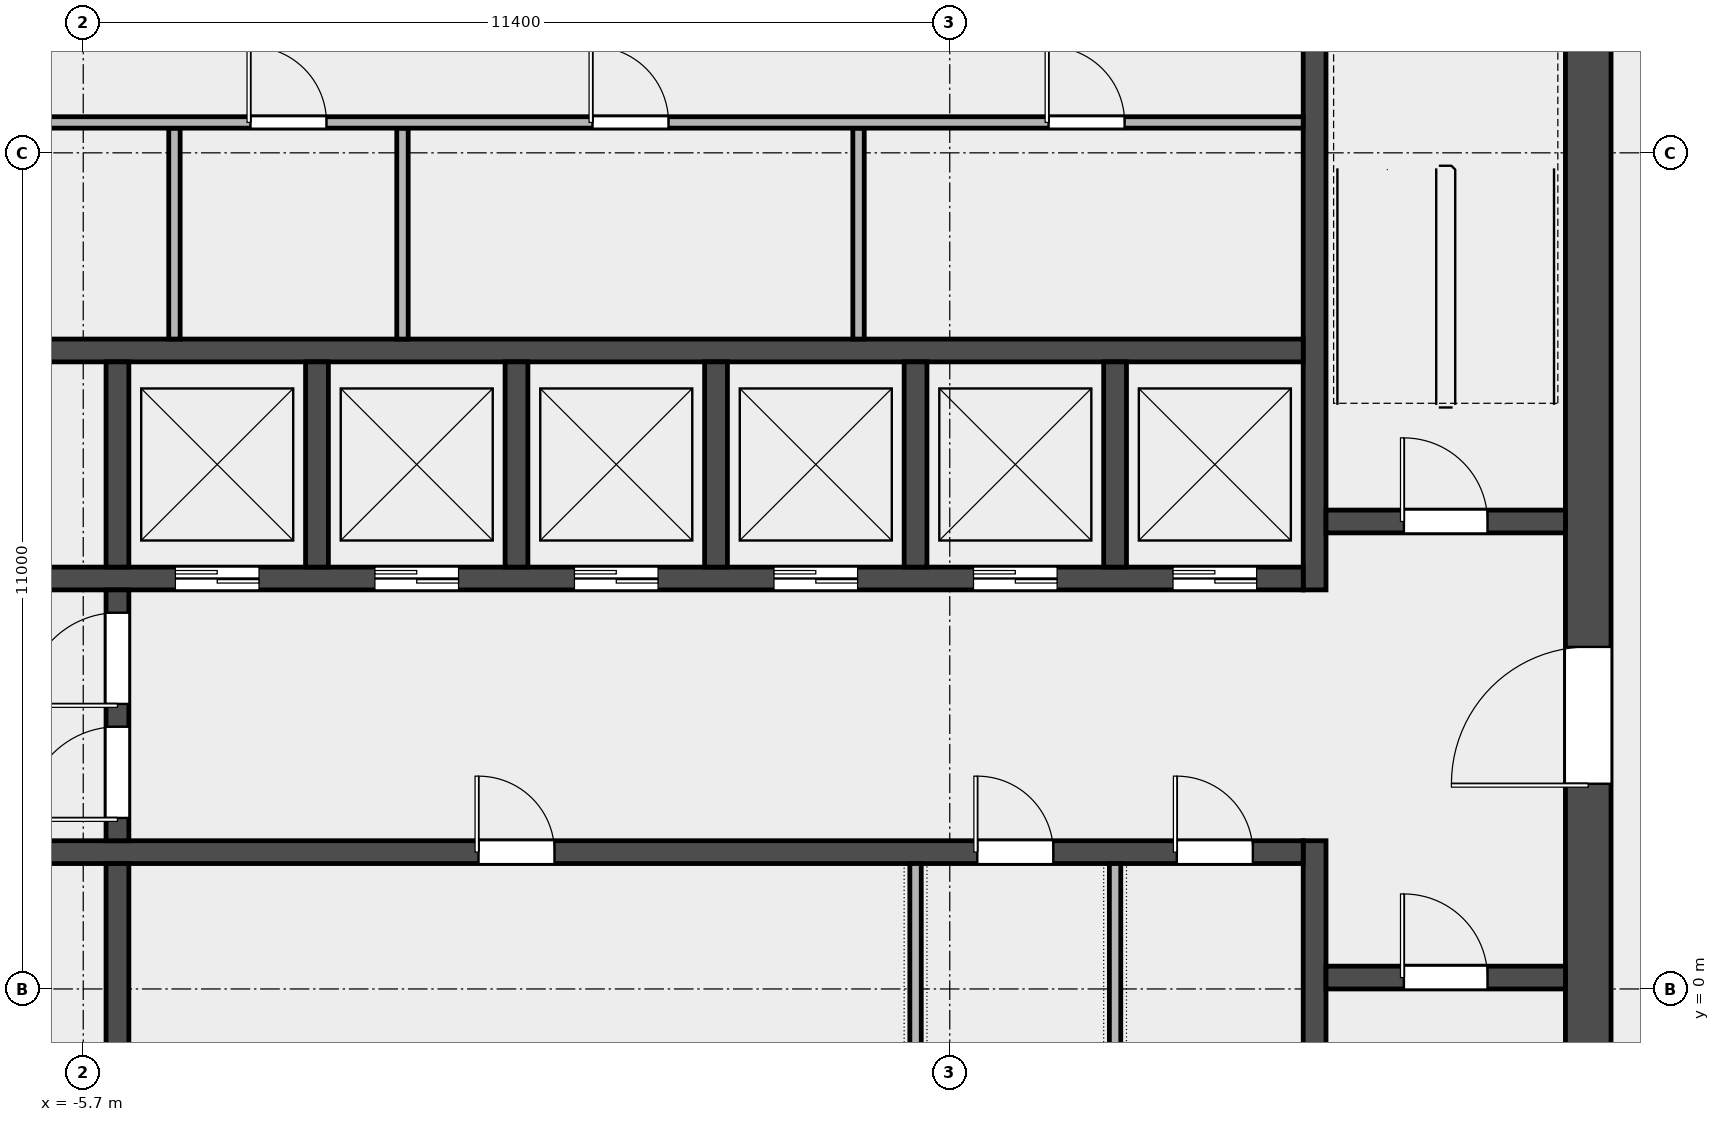
"""IFC4 building model, lengths in metres.
Left out: names, types, materials, properties, quantities, classifications, styles, units other than length and angle.
Written with IfcOpenShell. Run it as: python <this file> out.ifc"""

import sys

from ifc_helpers import new_model, si_unit, direction, frame, frame_2d, origin, place, context, subcontext, project, spatial, rectangle, extrude, element, fill, save


model = new_model("IFC4")
c1 = context("Model", 3, precision=1e-05, world=origin(), true_north=direction((0.0, 1.0)))
c2 = subcontext(c1, "Body", "Model", "MODEL_VIEW")
j1 = project(units=[si_unit("LENGTHUNIT", "METRE"), si_unit("PLANEANGLEUNIT", "RADIAN")], contexts=[c1])
p1 = place(None, origin())
s1 = spatial("IfcSite", under=j1, at=p1, CompositionType="ELEMENT")
p2 = place(p1, origin())
s2 = spatial("IfcBuilding", under=s1, at=p2, CompositionType="ELEMENT")
p3 = place(p2, frame((0.0, 0.0, 231.0)))
s3 = spatial("IfcBuildingStorey", under=s2, at=p3, CompositionType="ELEMENT", Elevation=231.0)
p4 = place(p3, frame((14.1, -6.6, 0.0), z_axis=(0.0, 0.0, 1.0), x_axis=(0.0, 1.0, 0.0)))
e1 = element("IfcWall", 1, at=p4, inside=s3, PredefinedType="SHEAR", context=c2, shape_type="SweptSolid", body=[
    extrude(rectangle(XDim=19.5, YDim=0.6, at=frame_2d((9.75, 0.0))), origin(), (0.0, 0.0, 1.0), 3.7),
])
p5 = place(p4, frame((9.3, 0.0, 0.0)))
e2 = element("IfcOpeningElement", 2, at=p5, cuts=e1, PredefinedType="OPENING", context=c2, shape_type="SweptSolid", body=[
    extrude(rectangle(XDim=1.8, YDim=2.1, at=frame_2d((0.9, 1.05))), frame((0.0, 0.312, 0.0), z_axis=(0.0, -1.0, 0.0), x_axis=(1.0, 0.0, 0.0)), (0.0, 0.0, 1.0), 0.624),
])
p6 = place(p3, frame((10.5, -6.6, 0.0), z_axis=(0.0, 0.0, 1.0), x_axis=(0.0, 1.0, 0.0)))
e3 = element("IfcWall", 3, at=p6, inside=s3, PredefinedType="SHEAR", context=c2, shape_type="SweptSolid", body=[
    extrude(rectangle(XDim=8.55, YDim=0.3, at=frame_2d((4.275, 0.0))), origin(), (0.0, 0.0, 1.0), 3.7),
])
p7 = place(p3, frame((10.5, 5.25, 0.0), z_axis=(0.0, 0.0, 1.0), x_axis=(0.0, 1.0, 0.0)))
e4 = element("IfcWall", 4, at=p7, inside=s3, PredefinedType="SHEAR", context=c2, shape_type="SweptSolid", body=[
    extrude(rectangle(XDim=7.65, YDim=0.3, at=frame_2d((3.825, 0.0))), origin(), (0.0, 0.0, 1.0), 3.7),
])
p8 = place(p3, frame((10.65, 0.15, 0.0), z_axis=(0.0, 0.0, 1.0), x_axis=(1.0, 0.0, 0.0)))
e5 = element("IfcWall", 5, at=p8, inside=s3, PredefinedType="SOLIDWALL", context=c2, shape_type="SweptSolid", body=[
    extrude(rectangle(XDim=3.15, YDim=0.3, at=frame_2d((1.575, 0.0))), origin(), (0.0, 0.0, 1.0), 3.7),
])
p9 = place(p8, frame((1.025, 0.0, 0.0)))
e6 = element("IfcOpeningElement", 6, at=p9, cuts=e5, PredefinedType="OPENING", context=c2, shape_type="SweptSolid", body=[
    extrude(rectangle(XDim=1.1, YDim=2.1, at=frame_2d((0.55, 1.05))), frame((0.0, 0.162, 0.0), z_axis=(0.0, -1.0, 0.0), x_axis=(1.0, 0.0, 0.0)), (0.0, 0.0, 1.0), 0.324),
])
p10 = place(p3, frame((10.65, 6.15, 0.0), z_axis=(0.0, 0.0, 1.0), x_axis=(1.0, 0.0, 0.0)))
e7 = element("IfcWall", 7, at=p10, inside=s3, PredefinedType="SOLIDWALL", context=c2, shape_type="SweptSolid", body=[
    extrude(rectangle(XDim=3.15, YDim=0.3, at=frame_2d((1.575, 0.0))), origin(), (0.0, 0.0, 1.0), 3.7),
])
p11 = place(p10, frame((1.025, 0.0, 0.0)))
e8 = element("IfcOpeningElement", 8, at=p11, cuts=e7, PredefinedType="OPENING", context=c2, shape_type="SweptSolid", body=[
    extrude(rectangle(XDim=1.1, YDim=2.1, at=frame_2d((0.55, 1.05))), frame((0.0, 0.162, 0.0), z_axis=(0.0, -1.0, 0.0), x_axis=(1.0, 0.0, 0.0)), (0.0, 0.0, 1.0), 0.324),
])
p12 = place(p3, frame((-10.35, 1.8, 0.0), z_axis=(0.0, 0.0, 1.0), x_axis=(1.0, 0.0, 0.0)))
e9 = element("IfcWall", 9, at=p12, inside=s3, PredefinedType="SOLIDWALL", context=c2, shape_type="SweptSolid", body=[
    extrude(rectangle(XDim=20.7, YDim=0.3, at=frame_2d((10.35, 0.0))), origin(), (0.0, 0.0, 1.0), 3.7),
])
p13 = place(p12, frame((0.512, 0.0, 0.0)))
e10 = element("IfcOpeningElement", 10, at=p13, cuts=e9, PredefinedType="OPENING", context=c2, shape_type="SweptSolid", body=[
    extrude(rectangle(XDim=1.3, YDim=2.1, at=frame_2d((0.65, 1.05))), frame((0.0, 0.162, 0.0), z_axis=(0.0, -1.0, 0.0), x_axis=(1.0, 0.0, 0.0)), (0.0, 0.0, 1.0), 0.324),
])
p14 = place(p12, frame((9.85, 0.0, 0.0)))
e11 = element("IfcOpeningElement", 11, at=p14, cuts=e9, PredefinedType="OPENING", context=c2, shape_type="SweptSolid", body=[
    extrude(rectangle(XDim=1.0, YDim=2.1, at=frame_2d((0.5, 1.05))), frame((0.0, 0.162, 0.0), z_axis=(0.0, -1.0, 0.0), x_axis=(1.0, 0.0, 0.0)), (0.0, 0.0, 1.0), 0.324),
])
p15 = place(p12, frame((16.413, 0.0, 0.0)))
e12 = element("IfcOpeningElement", 12, at=p15, cuts=e9, PredefinedType="OPENING", context=c2, shape_type="SweptSolid", body=[
    extrude(rectangle(XDim=1.0, YDim=2.1, at=frame_2d((0.5, 1.05))), frame((0.0, 0.162, 0.0), z_axis=(0.0, -1.0, 0.0), x_axis=(1.0, 0.0, 0.0)), (0.0, 0.0, 1.0), 0.324),
])
p16 = place(p12, frame((19.038, 0.0, 0.0)))
e13 = element("IfcOpeningElement", 13, at=p16, cuts=e9, PredefinedType="OPENING", context=c2, shape_type="SweptSolid", body=[
    extrude(rectangle(XDim=1.0, YDim=2.1, at=frame_2d((0.5, 1.05))), frame((0.0, 0.162, 0.0), z_axis=(0.0, -1.0, 0.0), x_axis=(1.0, 0.0, 0.0)), (0.0, 0.0, 1.0), 0.324),
])
p17 = place(p3, frame((-10.35, 5.4, 0.0), z_axis=(0.0, 0.0, 1.0), x_axis=(1.0, 0.0, 0.0)))
e14 = element("IfcWall", 14, at=p17, inside=s3, PredefinedType="SOLIDWALL", context=c2, shape_type="SweptSolid", body=[
    extrude(rectangle(XDim=20.7, YDim=0.3, at=frame_2d((10.35, 0.0))), origin(), (0.0, 0.0, 1.0), 3.7),
])
p18 = place(p17, frame((0.512, 0.0, 0.0)))
e15 = element("IfcOpeningElement", 15, at=p18, cuts=e14, PredefinedType="OPENING", context=c2, shape_type="SweptSolid", body=[
    extrude(rectangle(XDim=1.3, YDim=2.1, at=frame_2d((0.65, 1.05))), frame((0.0, 0.162, 0.0), z_axis=(0.0, -1.0, 0.0), x_axis=(1.0, 0.0, 0.0)), (0.0, 0.0, 1.0), 0.324),
])
p19 = place(p17, frame((5.863, 0.0, 0.0)))
e16 = element("IfcOpeningElement", 16, at=p19, cuts=e14, PredefinedType="OPENING", context=c2, shape_type="SweptSolid", body=[
    extrude(rectangle(XDim=1.1, YDim=2.1, at=frame_2d((0.55, 1.05))), frame((0.0, 0.162, 0.0), z_axis=(0.0, -1.0, 0.0), x_axis=(1.0, 0.0, 0.0)), (0.0, 0.0, 1.0), 0.324),
])
p20 = place(p17, frame((8.488, 0.0, 0.0)))
e17 = element("IfcOpeningElement", 17, at=p20, cuts=e14, PredefinedType="OPENING", context=c2, shape_type="SweptSolid", body=[
    extrude(rectangle(XDim=1.1, YDim=2.1, at=frame_2d((0.55, 1.05))), frame((0.0, 0.162, 0.0), z_axis=(0.0, -1.0, 0.0), x_axis=(1.0, 0.0, 0.0)), (0.0, 0.0, 1.0), 0.324),
])
p21 = place(p17, frame((11.113, 0.0, 0.0)))
e18 = element("IfcOpeningElement", 18, at=p21, cuts=e14, PredefinedType="OPENING", context=c2, shape_type="SweptSolid", body=[
    extrude(rectangle(XDim=1.1, YDim=2.1, at=frame_2d((0.55, 1.05))), frame((0.0, 0.162, 0.0), z_axis=(0.0, -1.0, 0.0), x_axis=(1.0, 0.0, 0.0)), (0.0, 0.0, 1.0), 0.324),
])
p22 = place(p17, frame((13.738, 0.0, 0.0)))
e19 = element("IfcOpeningElement", 19, at=p22, cuts=e14, PredefinedType="OPENING", context=c2, shape_type="SweptSolid", body=[
    extrude(rectangle(XDim=1.1, YDim=2.1, at=frame_2d((0.55, 1.05))), frame((0.0, 0.162, 0.0), z_axis=(0.0, -1.0, 0.0), x_axis=(1.0, 0.0, 0.0)), (0.0, 0.0, 1.0), 0.324),
])
p23 = place(p17, frame((16.363, 0.0, 0.0)))
e20 = element("IfcOpeningElement", 20, at=p23, cuts=e14, PredefinedType="OPENING", context=c2, shape_type="SweptSolid", body=[
    extrude(rectangle(XDim=1.1, YDim=2.1, at=frame_2d((0.55, 1.05))), frame((0.0, 0.162, 0.0), z_axis=(0.0, -1.0, 0.0), x_axis=(1.0, 0.0, 0.0)), (0.0, 0.0, 1.0), 0.324),
])
p24 = place(p17, frame((18.988, 0.0, 0.0)))
e21 = element("IfcOpeningElement", 21, at=p24, cuts=e14, PredefinedType="OPENING", context=c2, shape_type="SweptSolid", body=[
    extrude(rectangle(XDim=1.1, YDim=2.1, at=frame_2d((0.55, 1.05))), frame((0.0, 0.162, 0.0), z_axis=(0.0, -1.0, 0.0), x_axis=(1.0, 0.0, 0.0)), (0.0, 0.0, 1.0), 0.324),
])
p25 = place(p3, frame((-10.35, 8.4, 0.0), z_axis=(0.0, 0.0, 1.0), x_axis=(1.0, 0.0, 0.0)))
e22 = element("IfcWall", 22, at=p25, inside=s3, PredefinedType="SOLIDWALL", context=c2, shape_type="SweptSolid", body=[
    extrude(rectangle(XDim=20.7, YDim=0.3, at=frame_2d((10.35, 0.0))), origin(), (0.0, 0.0, 1.0), 3.7),
])
for number, where, z_axis, x_axis in (
    (23, (-5.25, -1.05, 0.0), (0.0, 0.0, 1.0), (0.0, 1.0, 0.0)),
    (24, (-5.25, 5.55, 0.0), (0.0, 0.0, 1.0), (0.0, 1.0, 0.0)),
    (25, (-2.625, 5.55, 0.0), (0.0, 0.0, 1.0), (0.0, 1.0, 0.0)),
    (26, (0.0, 5.55, 0.0), (0.0, 0.0, 1.0), (0.0, 1.0, 0.0)),
    (27, (2.625, 5.55, 0.0), (0.0, 0.0, 1.0), (0.0, 1.0, 0.0)),
    (28, (5.25, 5.55, 0.0), (0.0, 0.0, 1.0), (0.0, 1.0, 0.0)),
    (29, (7.875, 5.55, 0.0), (0.0, 0.0, 1.0), (0.0, 1.0, 0.0)),
):
    element("IfcWall", number, at=place(p3, frame(where, z_axis=z_axis, x_axis=x_axis)), inside=s3, PredefinedType="SOLIDWALL", context=c2, shape_type="SweptSolid", body=[
        extrude(rectangle(XDim=2.7, YDim=0.3, at=frame_2d((1.35, 0.0))), origin(), (0.0, 0.0, 1.0), 3.7),
    ])
p26 = place(p3, frame((-5.25, 1.95, 0.0), z_axis=(0.0, 0.0, 1.0), x_axis=(0.0, 1.0, 0.0)))
e30 = element("IfcWall", 30, at=p26, inside=s3, PredefinedType="SOLIDWALL", context=c2, shape_type="SweptSolid", body=[
    extrude(rectangle(XDim=3.3, YDim=0.3, at=frame_2d((1.65, 0.0))), origin(), (0.0, 0.0, 1.0), 3.7),
])
p27 = place(p26, frame((0.3, 0.0, 0.0)))
e31 = element("IfcOpeningElement", 31, at=p27, cuts=e30, PredefinedType="OPENING", context=c2, shape_type="SweptSolid", body=[
    extrude(rectangle(XDim=1.2, YDim=2.1, at=frame_2d((0.6, 1.05))), frame((0.0, 0.162, 0.0), z_axis=(0.0, -1.0, 0.0), x_axis=(1.0, 0.0, 0.0)), (0.0, 0.0, 1.0), 0.324),
])
p28 = place(p26, frame((1.8, 0.0, 0.0)))
e32 = element("IfcOpeningElement", 32, at=p28, cuts=e30, PredefinedType="OPENING", context=c2, shape_type="SweptSolid", body=[
    extrude(rectangle(XDim=1.2, YDim=2.1, at=frame_2d((0.6, 1.05))), frame((0.0, 0.162, 0.0), z_axis=(0.0, -1.0, 0.0), x_axis=(1.0, 0.0, 0.0)), (0.0, 0.0, 1.0), 0.324),
])
for number, where, z_axis, x_axis in (
    (33, (-4.5, 8.55, 0.0), (0.0, 0.0, 1.0), (0.0, 1.0, 0.0)),
    (34, (-1.5, 8.55, 0.0), (0.0, 0.0, 1.0), (0.0, 1.0, 0.0)),
    (35, (4.5, 8.55, 0.0), (0.0, 0.0, 1.0), (0.0, 1.0, 0.0)),
):
    element("IfcWall", number, at=place(p3, frame(where, z_axis=z_axis, x_axis=x_axis)), inside=s3, PredefinedType="PARTITIONING", context=c2, shape_type="SweptSolid", body=[
        extrude(rectangle(XDim=2.775, YDim=0.15, at=frame_2d((1.387, 0.0))), origin(), (0.0, 0.0, 1.0), 3.7),
    ])
p29 = place(p3, frame((-10.35, 11.4, 0.0), z_axis=(0.0, 0.0, 1.0), x_axis=(1.0, 0.0, 0.0)))
e36 = element("IfcWall", 36, at=p29, inside=s3, PredefinedType="PARTITIONING", context=c2, shape_type="SweptSolid", body=[
    extrude(rectangle(XDim=20.7, YDim=0.15, at=frame_2d((10.35, 0.0))), origin(), (0.0, 0.0, 1.0), 3.7),
])
p30 = place(p29, frame((2.35, 0.0, 0.0)))
e37 = element("IfcOpeningElement", 37, at=p30, cuts=e36, PredefinedType="OPENING", context=c2, shape_type="SweptSolid", body=[
    extrude(rectangle(XDim=1.0, YDim=2.1, at=frame_2d((0.5, 1.05))), frame((0.0, 0.087, 0.0), z_axis=(0.0, -1.0, 0.0), x_axis=(1.0, 0.0, 0.0)), (0.0, 0.0, 1.0), 0.174),
])
p31 = place(p29, frame((6.85, 0.0, 0.0)))
e38 = element("IfcOpeningElement", 38, at=p31, cuts=e36, PredefinedType="OPENING", context=c2, shape_type="SweptSolid", body=[
    extrude(rectangle(XDim=1.0, YDim=2.1, at=frame_2d((0.5, 1.05))), frame((0.0, 0.087, 0.0), z_axis=(0.0, -1.0, 0.0), x_axis=(1.0, 0.0, 0.0)), (0.0, 0.0, 1.0), 0.174),
])
p32 = place(p29, frame((11.35, 0.0, 0.0)))
e39 = element("IfcOpeningElement", 39, at=p32, cuts=e36, PredefinedType="OPENING", context=c2, shape_type="SweptSolid", body=[
    extrude(rectangle(XDim=1.0, YDim=2.1, at=frame_2d((0.5, 1.05))), frame((0.0, 0.087, 0.0), z_axis=(0.0, -1.0, 0.0), x_axis=(1.0, 0.0, 0.0)), (0.0, 0.0, 1.0), 0.174),
])
p33 = place(p29, frame((17.35, 0.0, 0.0)))
e40 = element("IfcOpeningElement", 40, at=p33, cuts=e36, PredefinedType="OPENING", context=c2, shape_type="SweptSolid", body=[
    extrude(rectangle(XDim=1.0, YDim=2.1, at=frame_2d((0.5, 1.05))), frame((0.0, 0.087, 0.0), z_axis=(0.0, -1.0, 0.0), x_axis=(1.0, 0.0, 0.0)), (0.0, 0.0, 1.0), 0.174),
])
for number, where, z_axis, x_axis in (
    (41, (5.25, -1.05, 0.0), (0.0, 0.0, 1.0), (0.0, 1.0, 0.0)),
    (42, (7.875, -1.05, 0.0), (0.0, 0.0, 1.0), (0.0, 1.0, 0.0)),
):
    element("IfcWall", number, at=place(p3, frame(where, z_axis=z_axis, x_axis=x_axis)), inside=s3, PredefinedType="PARTITIONING", context=c2, shape_type="SweptSolid", body=[
        extrude(rectangle(XDim=2.7, YDim=0.15, at=frame_2d((1.35, 0.0))), origin(), (0.0, 0.0, 1.0), 3.7),
    ])
p34 = place(p9, origin())
e43 = element("IfcDoor", 43, at=p34, inside=s3, OperationType="SINGLE_SWING_RIGHT", PredefinedType="DOOR", context=c2, shape_type="SweptSolid", body=[
    extrude(rectangle(XDim=1.1, YDim=2.1, at=frame_2d((0.55, 1.05))), frame((0.0, 0.025, 0.0), z_axis=(0.0, -1.0, 0.0), x_axis=(1.0, 0.0, 0.0)), (0.0, 0.0, 1.0), 0.05),
])
fill(e6, e43)
p35 = place(p11, origin())
e44 = element("IfcDoor", 44, at=p35, inside=s3, OperationType="SINGLE_SWING_RIGHT", PredefinedType="DOOR", context=c2, shape_type="SweptSolid", body=[
    extrude(rectangle(XDim=1.1, YDim=2.1, at=frame_2d((0.55, 1.05))), frame((0.0, 0.025, 0.0), z_axis=(0.0, -1.0, 0.0), x_axis=(1.0, 0.0, 0.0)), (0.0, 0.0, 1.0), 0.05),
])
fill(e8, e44)
p36 = place(p5, origin())
e45 = element("IfcDoor", 45, at=p36, inside=s3, OperationType="DOUBLE_DOOR_SINGLE_SWING", PredefinedType="DOOR", context=c2, shape_type="SweptSolid", body=[
    extrude(rectangle(XDim=1.8, YDim=2.1, at=frame_2d((0.9, 1.05))), frame((0.0, 0.025, 0.0), z_axis=(0.0, -1.0, 0.0), x_axis=(1.0, 0.0, 0.0)), (0.0, 0.0, 1.0), 0.05),
])
fill(e2, e45)
p37 = place(p27, origin())
e46 = element("IfcDoor", 46, at=p37, inside=s3, OperationType="SINGLE_SWING_LEFT", PredefinedType="DOOR", context=c2, shape_type="SweptSolid", body=[
    extrude(rectangle(XDim=1.2, YDim=2.1, at=frame_2d((0.6, 1.05))), frame((0.0, 0.025, 0.0), z_axis=(0.0, -1.0, 0.0), x_axis=(1.0, 0.0, 0.0)), (0.0, 0.0, 1.0), 0.05),
])
fill(e31, e46)
p38 = place(p28, origin())
e47 = element("IfcDoor", 47, at=p38, inside=s3, OperationType="SINGLE_SWING_RIGHT", PredefinedType="DOOR", context=c2, shape_type="SweptSolid", body=[
    extrude(rectangle(XDim=1.2, YDim=2.1, at=frame_2d((0.6, 1.05))), frame((0.0, 0.025, 0.0), z_axis=(0.0, -1.0, 0.0), x_axis=(1.0, 0.0, 0.0)), (0.0, 0.0, 1.0), 0.05),
])
fill(e32, e47)
p39 = place(p19, origin())
e48 = element("IfcDoor", 48, at=p39, inside=s3, OperationType="DOUBLE_DOOR_SLIDING", PredefinedType="DOOR", context=c2, shape_type="SweptSolid", body=[
    extrude(rectangle(XDim=1.1, YDim=2.1, at=frame_2d((0.55, 1.05))), frame((0.0, 0.025, 0.0), z_axis=(0.0, -1.0, 0.0), x_axis=(1.0, 0.0, 0.0)), (0.0, 0.0, 1.0), 0.05),
])
fill(e16, e48)
p40 = place(p20, origin())
e49 = element("IfcDoor", 49, at=p40, inside=s3, OperationType="DOUBLE_DOOR_SLIDING", PredefinedType="DOOR", context=c2, shape_type="SweptSolid", body=[
    extrude(rectangle(XDim=1.1, YDim=2.1, at=frame_2d((0.55, 1.05))), frame((0.0, 0.025, 0.0), z_axis=(0.0, -1.0, 0.0), x_axis=(1.0, 0.0, 0.0)), (0.0, 0.0, 1.0), 0.05),
])
fill(e17, e49)
p41 = place(p21, origin())
e50 = element("IfcDoor", 50, at=p41, inside=s3, OperationType="DOUBLE_DOOR_SLIDING", PredefinedType="DOOR", context=c2, shape_type="SweptSolid", body=[
    extrude(rectangle(XDim=1.1, YDim=2.1, at=frame_2d((0.55, 1.05))), frame((0.0, 0.025, 0.0), z_axis=(0.0, -1.0, 0.0), x_axis=(1.0, 0.0, 0.0)), (0.0, 0.0, 1.0), 0.05),
])
fill(e18, e50)
p42 = place(p22, origin())
e51 = element("IfcDoor", 51, at=p42, inside=s3, OperationType="DOUBLE_DOOR_SLIDING", PredefinedType="DOOR", context=c2, shape_type="SweptSolid", body=[
    extrude(rectangle(XDim=1.1, YDim=2.1, at=frame_2d((0.55, 1.05))), frame((0.0, 0.025, 0.0), z_axis=(0.0, -1.0, 0.0), x_axis=(1.0, 0.0, 0.0)), (0.0, 0.0, 1.0), 0.05),
])
fill(e19, e51)
p43 = place(p23, origin())
e52 = element("IfcDoor", 52, at=p43, inside=s3, OperationType="DOUBLE_DOOR_SLIDING", PredefinedType="DOOR", context=c2, shape_type="SweptSolid", body=[
    extrude(rectangle(XDim=1.1, YDim=2.1, at=frame_2d((0.55, 1.05))), frame((0.0, 0.025, 0.0), z_axis=(0.0, -1.0, 0.0), x_axis=(1.0, 0.0, 0.0)), (0.0, 0.0, 1.0), 0.05),
])
fill(e20, e52)
p44 = place(p24, origin())
e53 = element("IfcDoor", 53, at=p44, inside=s3, OperationType="DOUBLE_DOOR_SLIDING", PredefinedType="DOOR", context=c2, shape_type="SweptSolid", body=[
    extrude(rectangle(XDim=1.1, YDim=2.1, at=frame_2d((0.55, 1.05))), frame((0.0, 0.025, 0.0), z_axis=(0.0, -1.0, 0.0), x_axis=(1.0, 0.0, 0.0)), (0.0, 0.0, 1.0), 0.05),
])
fill(e21, e53)
p45 = place(p31, origin())
e54 = element("IfcDoor", 54, at=p45, inside=s3, OperationType="SINGLE_SWING_LEFT", PredefinedType="DOOR", context=c2, shape_type="SweptSolid", body=[
    extrude(rectangle(XDim=1.0, YDim=2.1, at=frame_2d((0.5, 1.05))), frame((0.0, 0.025, 0.0), z_axis=(0.0, -1.0, 0.0), x_axis=(1.0, 0.0, 0.0)), (0.0, 0.0, 1.0), 0.05),
])
fill(e38, e54)
p46 = place(p32, origin())
e55 = element("IfcDoor", 55, at=p46, inside=s3, OperationType="SINGLE_SWING_LEFT", PredefinedType="DOOR", context=c2, shape_type="SweptSolid", body=[
    extrude(rectangle(XDim=1.0, YDim=2.1, at=frame_2d((0.5, 1.05))), frame((0.0, 0.025, 0.0), z_axis=(0.0, -1.0, 0.0), x_axis=(1.0, 0.0, 0.0)), (0.0, 0.0, 1.0), 0.05),
])
fill(e39, e55)
p47 = place(p33, origin())
e56 = element("IfcDoor", 56, at=p47, inside=s3, OperationType="SINGLE_SWING_LEFT", PredefinedType="DOOR", context=c2, shape_type="SweptSolid", body=[
    extrude(rectangle(XDim=1.0, YDim=2.1, at=frame_2d((0.5, 1.05))), frame((0.0, 0.025, 0.0), z_axis=(0.0, -1.0, 0.0), x_axis=(1.0, 0.0, 0.0)), (0.0, 0.0, 1.0), 0.05),
])
fill(e40, e56)
p48 = place(p14, origin())
e57 = element("IfcDoor", 57, at=p48, inside=s3, OperationType="SINGLE_SWING_LEFT", PredefinedType="DOOR", context=c2, shape_type="SweptSolid", body=[
    extrude(rectangle(XDim=1.0, YDim=2.1, at=frame_2d((0.5, 1.05))), frame((0.0, 0.025, 0.0), z_axis=(0.0, -1.0, 0.0), x_axis=(1.0, 0.0, 0.0)), (0.0, 0.0, 1.0), 0.05),
])
fill(e11, e57)
p49 = place(p15, origin())
e58 = element("IfcDoor", 58, at=p49, inside=s3, OperationType="SINGLE_SWING_LEFT", PredefinedType="DOOR", context=c2, shape_type="SweptSolid", body=[
    extrude(rectangle(XDim=1.0, YDim=2.1, at=frame_2d((0.5, 1.05))), frame((0.0, 0.025, 0.0), z_axis=(0.0, -1.0, 0.0), x_axis=(1.0, 0.0, 0.0)), (0.0, 0.0, 1.0), 0.05),
])
fill(e12, e58)
p50 = place(p16, origin())
e59 = element("IfcDoor", 59, at=p50, inside=s3, OperationType="SINGLE_SWING_LEFT", PredefinedType="DOOR", context=c2, shape_type="SweptSolid", body=[
    extrude(rectangle(XDim=1.0, YDim=2.1, at=frame_2d((0.5, 1.05))), frame((0.0, 0.025, 0.0), z_axis=(0.0, -1.0, 0.0), x_axis=(1.0, 0.0, 0.0)), (0.0, 0.0, 1.0), 0.05),
])
fill(e13, e59)
save(model, sys.argv[1])
